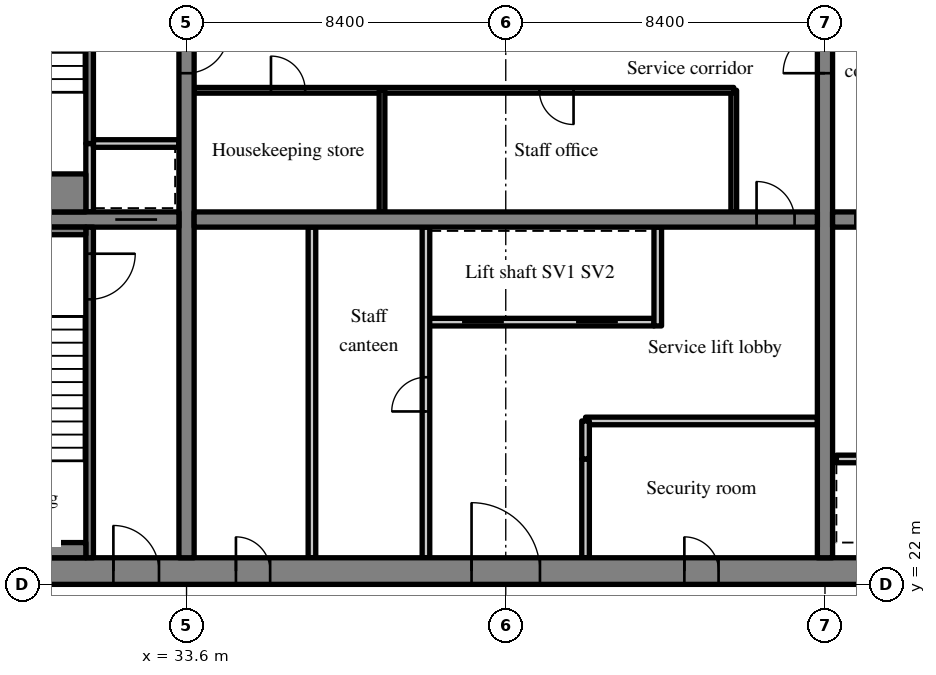
"""IFC4 building model, lengths in metres.
Left out: names, types, materials, properties, quantities, classifications, styles, units other than length and angle.
Written with IfcOpenShell. Run it as: python <this file> out.ifc"""

import sys

from ifc_helpers import new_model, si_unit, direction, frame, frame_2d, origin, place, context, subcontext, project, spatial, rectangle, extrude, source, transform, mapped, element, fill, save


model = new_model("IFC4")
c1 = context("Model", 3, precision=1e-05, world=origin(), true_north=direction((0.0, 1.0)))
c2 = subcontext(c1, "Body", "Model", "MODEL_VIEW")
j1 = project(units=[si_unit("LENGTHUNIT", "METRE"), si_unit("PLANEANGLEUNIT", "RADIAN")], contexts=[c1])
p1 = place(None, origin())
s1 = spatial("IfcSite", under=j1, at=p1, CompositionType="ELEMENT")
p2 = place(p1, origin())
s2 = spatial("IfcBuilding", under=s1, at=p2, CompositionType="ELEMENT")
p3 = place(p2, frame((0.0, 0.0, 166.8)))
s3 = spatial("IfcBuildingStorey", under=s2, at=p3, CompositionType="ELEMENT", Elevation=166.8)
m1 = source(origin(), c2, "Body", "SweptSolid", [
    extrude(rectangle(XDim=50.4, YDim=0.7, at=frame_2d((25.2, 0.0))), origin(), (0.0, 0.0, 1.0), 3.52),
])
p4 = place(p3, frame((25.2, 22.35, 0.0), z_axis=(0.0, 0.0, 1.0), x_axis=(1.0, 0.0, 0.0)))
e1 = element("IfcWall", 1, at=p4, inside=s3, PredefinedType="SHEAR", context=c2, shape_type="MappedRepresentation", body=[
    mapped(m1, transform((0.0, 0.0, 0.0), scale=1.0)),
])
m2 = source(origin(), c2, "Body", "SweptSolid", [
    extrude(rectangle(XDim=1.8, YDim=2.1, at=frame_2d((0.9, 1.05))), frame((0.0, 0.36, 0.0), z_axis=(0.0, -1.0, 0.0), x_axis=(1.0, 0.0, 0.0)), (0.0, 0.0, 1.0), 0.72),
])
p5 = place(p4, frame((15.9, 0.0, 0.0)))
e2 = element("IfcOpeningElement", 2, at=p5, cuts=e1, PredefinedType="OPENING", context=c2, shape_type="MappedRepresentation", body=[
    mapped(m2, transform((0.0, 0.0, 0.0), scale=1.0)),
])
m3 = source(origin(), c2, "Body", "SweptSolid", [
    extrude(rectangle(XDim=0.9, YDim=2.1, at=frame_2d((0.45, 1.05))), frame((0.0, 0.36, 0.0), z_axis=(0.0, -1.0, 0.0), x_axis=(1.0, 0.0, 0.0)), (0.0, 0.0, 1.0), 0.72),
])
p6 = place(p4, frame((9.7, 0.0, 0.0)))
e3 = element("IfcOpeningElement", 3, at=p6, cuts=e1, PredefinedType="OPENING", context=c2, shape_type="MappedRepresentation", body=[
    mapped(m3, transform((0.0, 0.0, 0.0), scale=1.0)),
])
p7 = place(p4, frame((21.5, 0.0, 0.0)))
e4 = element("IfcOpeningElement", 4, at=p7, cuts=e1, PredefinedType="OPENING", context=c2, shape_type="MappedRepresentation", body=[
    mapped(m3, transform((0.0, 0.0, 0.0), scale=1.0)),
])
p8 = place(p4, frame((32.7, 0.0, 0.0)))
e5 = element("IfcOpeningElement", 5, at=p8, cuts=e1, PredefinedType="OPENING", context=c2, shape_type="MappedRepresentation", body=[
    mapped(m2, transform((0.0, 0.0, 0.0), scale=1.0)),
])
m4 = source(origin(), c2, "Body", "SweptSolid", [
    extrude(rectangle(XDim=1.2, YDim=2.1, at=frame_2d((0.6, 1.05))), frame((0.0, 0.36, 0.0), z_axis=(0.0, -1.0, 0.0), x_axis=(1.0, 0.0, 0.0)), (0.0, 0.0, 1.0), 0.72),
])
p9 = place(p4, frame((6.475, 0.0, 0.0)))
e6 = element("IfcOpeningElement", 6, at=p9, cuts=e1, PredefinedType="OPENING", context=c2, shape_type="MappedRepresentation", body=[
    mapped(m4, transform((0.0, 0.0, 0.0), scale=1.0)),
])
p10 = place(p4, frame((47.875, 0.0, 0.0)))
e7 = element("IfcOpeningElement", 7, at=p10, cuts=e1, PredefinedType="OPENING", context=c2, shape_type="MappedRepresentation", body=[
    mapped(m4, transform((0.0, 0.0, 0.0), scale=1.0)),
])
m5 = source(origin(), c2, "Body", "SweptSolid", [
    extrude(rectangle(XDim=18.6, YDim=0.4, at=frame_2d((9.3, 0.0))), origin(), (0.0, 0.0, 1.0), 3.52),
])
p11 = place(p3, frame((33.6, 22.7, 0.0), z_axis=(0.0, 0.0, 1.0), x_axis=(0.0, 1.0, 0.0)))
e8 = element("IfcWall", 8, at=p11, inside=s3, PredefinedType="SHEAR", context=c2, shape_type="MappedRepresentation", body=[
    mapped(m5, transform((0.0, 0.0, 0.0), scale=1.0)),
])
m6 = source(origin(), c2, "Body", "SweptSolid", [
    extrude(rectangle(XDim=1.1, YDim=2.1, at=frame_2d((0.55, 1.05))), frame((0.0, 0.21, 0.0), z_axis=(0.0, -1.0, 0.0), x_axis=(1.0, 0.0, 0.0)), (0.0, 0.0, 1.0), 0.42),
])
p12 = place(p11, frame((12.75, 0.0, 0.0)))
e9 = element("IfcOpeningElement", 9, at=p12, cuts=e8, PredefinedType="OPENING", context=c2, shape_type="MappedRepresentation", body=[
    mapped(m6, transform((0.0, 0.0, 0.0), scale=1.0)),
])
p13 = place(p3, frame((50.4, 22.7, 0.0), z_axis=(0.0, 0.0, 1.0), x_axis=(0.0, 1.0, 0.0)))
e10 = element("IfcWall", 10, at=p13, inside=s3, PredefinedType="SHEAR", context=c2, shape_type="MappedRepresentation", body=[
    mapped(m5, transform((0.0, 0.0, 0.0), scale=1.0)),
])
p14 = place(p13, frame((12.75, 0.0, 0.0)))
e11 = element("IfcOpeningElement", 11, at=p14, cuts=e10, PredefinedType="OPENING", context=c2, shape_type="MappedRepresentation", body=[
    mapped(m6, transform((0.0, 0.0, 0.0), scale=1.0)),
])
m7 = source(origin(), c2, "Body", "SweptSolid", [
    extrude(rectangle(XDim=7.5, YDim=0.4, at=frame_2d((3.75, 0.0))), origin(), (0.0, 0.0, 1.0), 3.52),
])
p15 = place(p3, frame((25.9, 31.6, 0.0), z_axis=(0.0, 0.0, 1.0), x_axis=(1.0, 0.0, 0.0)))
e12 = element("IfcWall", 12, at=p15, inside=s3, PredefinedType="SHEAR", context=c2, shape_type="MappedRepresentation", body=[
    mapped(m7, transform((0.0, 0.0, 0.0), scale=1.0)),
])
p16 = place(p15, frame((5.825, 0.0, 0.0)))
e13 = element("IfcOpeningElement", 13, at=p16, cuts=e12, PredefinedType="OPENING", context=c2, shape_type="MappedRepresentation", body=[
    mapped(m6, transform((0.0, 0.0, 0.0), scale=1.0)),
])
m8 = source(origin(), c2, "Body", "SweptSolid", [
    extrude(rectangle(XDim=16.4, YDim=0.4, at=frame_2d((8.2, 0.0))), origin(), (0.0, 0.0, 1.0), 3.52),
])
p17 = place(p3, frame((33.8, 31.6, 0.0), z_axis=(0.0, 0.0, 1.0), x_axis=(1.0, 0.0, 0.0)))
e14 = element("IfcWall", 14, at=p17, inside=s3, PredefinedType="SHEAR", context=c2, shape_type="MappedRepresentation", body=[
    mapped(m8, transform((0.0, 0.0, 0.0), scale=1.0)),
])
m9 = source(origin(), c2, "Body", "SweptSolid", [
    extrude(rectangle(XDim=1.0, YDim=2.1, at=frame_2d((0.5, 1.05))), frame((0.0, 0.21, 0.0), z_axis=(0.0, -1.0, 0.0), x_axis=(1.0, 0.0, 0.0)), (0.0, 0.0, 1.0), 0.42),
])
p18 = place(p17, frame((14.8, 0.0, 0.0)))
e15 = element("IfcOpeningElement", 15, at=p18, cuts=e14, PredefinedType="OPENING", context=c2, shape_type="MappedRepresentation", body=[
    mapped(m9, transform((0.0, 0.0, 0.0), scale=1.0)),
])
p19 = place(p3, frame((50.6, 31.6, 0.0), z_axis=(0.0, 0.0, 1.0), x_axis=(1.0, 0.0, 0.0)))
e16 = element("IfcWall", 16, at=p19, inside=s3, PredefinedType="SHEAR", context=c2, shape_type="MappedRepresentation", body=[
    mapped(m8, transform((0.0, 0.0, 0.0), scale=1.0)),
])
p20 = place(p19, frame((0.6, 0.0, 0.0)))
e17 = element("IfcOpeningElement", 17, at=p20, cuts=e16, PredefinedType="OPENING", context=c2, shape_type="MappedRepresentation", body=[
    mapped(m9, transform((0.0, 0.0, 0.0), scale=1.0)),
])
m10 = source(origin(), c2, "Body", "SweptSolid", [
    extrude(rectangle(XDim=6.0, YDim=0.2, at=frame_2d((3.0, 0.0))), origin(), (0.0, 0.0, 1.0), 3.52),
])
p21 = place(p3, frame((39.9, 28.9, 0.0), z_axis=(0.0, 0.0, 1.0), x_axis=(1.0, 0.0, 0.0)))
e18 = element("IfcWall", 18, at=p21, inside=s3, PredefinedType="SOLIDWALL", context=c2, shape_type="MappedRepresentation", body=[
    mapped(m10, transform((0.0, 0.0, 0.0), scale=1.0)),
])
m11 = source(origin(), c2, "Body", "SweptSolid", [
    extrude(rectangle(XDim=1.1, YDim=2.1, at=frame_2d((0.55, 1.05))), frame((0.0, 0.11, 0.0), z_axis=(0.0, -1.0, 0.0), x_axis=(1.0, 0.0, 0.0)), (0.0, 0.0, 1.0), 0.22),
])
p22 = place(p21, frame((0.95, 0.0, 0.0)))
e19 = element("IfcOpeningElement", 19, at=p22, cuts=e18, PredefinedType="OPENING", context=c2, shape_type="MappedRepresentation", body=[
    mapped(m11, transform((0.0, 0.0, 0.0), scale=1.0)),
])
p23 = place(p21, frame((3.95, 0.0, 0.0)))
e20 = element("IfcOpeningElement", 20, at=p23, cuts=e18, PredefinedType="OPENING", context=c2, shape_type="MappedRepresentation", body=[
    mapped(m11, transform((0.0, 0.0, 0.0), scale=1.0)),
])
m12 = source(origin(), c2, "Body", "SweptSolid", [
    extrude(rectangle(XDim=8.7, YDim=0.2, at=frame_2d((4.35, 0.0))), origin(), (0.0, 0.0, 1.0), 3.52),
])
p24 = place(p3, frame((39.9, 22.7, 0.0), z_axis=(0.0, 0.0, 1.0), x_axis=(0.0, 1.0, 0.0)))
e21 = element("IfcWall", 21, at=p24, inside=s3, PredefinedType="PARTITIONING", context=c2, shape_type="MappedRepresentation", body=[
    mapped(m12, transform((0.0, 0.0, 0.0), scale=1.0)),
])
m13 = source(origin(), c2, "Body", "SweptSolid", [
    extrude(rectangle(XDim=0.9, YDim=2.1, at=frame_2d((0.45, 1.05))), frame((0.0, 0.11, 0.0), z_axis=(0.0, -1.0, 0.0), x_axis=(1.0, 0.0, 0.0)), (0.0, 0.0, 1.0), 0.22),
])
p25 = place(p24, frame((3.85, 0.0, 0.0)))
e22 = element("IfcOpeningElement", 22, at=p25, cuts=e21, PredefinedType="OPENING", context=c2, shape_type="MappedRepresentation", body=[
    mapped(m13, transform((0.0, 0.0, 0.0), scale=1.0)),
])
m14 = source(origin(), c2, "Body", "SweptSolid", [
    extrude(rectangle(XDim=2.6, YDim=0.2, at=frame_2d((1.3, 0.0))), origin(), (0.0, 0.0, 1.0), 3.52),
])
p26 = place(p3, frame((44.1, 22.7, 0.0), z_axis=(0.0, 0.0, 1.0), x_axis=(0.0, 1.0, 0.0)))
e23 = element("IfcWall", 23, at=p26, inside=s3, PredefinedType="PARTITIONING", context=c2, shape_type="MappedRepresentation", body=[
    mapped(m14, transform((0.0, 0.0, 0.0), scale=1.0)),
])
m15 = source(origin(), c2, "Body", "SweptSolid", [
    extrude(rectangle(XDim=2.6, YDim=0.2, at=frame_2d((1.3, 0.0))), origin(), (0.0, 0.0, 1.0), 3.52),
])
p27 = place(p3, frame((46.0, 28.8, 0.0), z_axis=(0.0, 0.0, 1.0), x_axis=(0.0, 1.0, 0.0)))
e24 = element("IfcWall", 24, at=p27, inside=s3, PredefinedType="SOLIDWALL", context=c2, shape_type="MappedRepresentation", body=[
    mapped(m15, transform((0.0, 0.0, 0.0), scale=1.0)),
])
p28 = place(p3, frame((36.9, 22.7, 0.0), z_axis=(0.0, 0.0, 1.0), x_axis=(0.0, 1.0, 0.0)))
e25 = element("IfcWall", 25, at=p28, inside=s3, PredefinedType="PARTITIONING", context=c2, shape_type="MappedRepresentation", body=[
    mapped(m12, transform((0.0, 0.0, 0.0), scale=1.0)),
])
m16 = source(origin(), c2, "Body", "SweptSolid", [
    extrude(rectangle(XDim=6.1, YDim=0.2, at=frame_2d((3.05, 0.0))), origin(), (0.0, 0.0, 1.0), 3.52),
])
p29 = place(p3, frame((44.1, 26.3, 0.0), z_axis=(0.0, 0.0, 1.0), x_axis=(1.0, 0.0, 0.0)))
e26 = element("IfcWall", 26, at=p29, inside=s3, PredefinedType="PARTITIONING", context=c2, shape_type="MappedRepresentation", body=[
    mapped(m16, transform((0.0, 0.0, 0.0), scale=1.0)),
])
m17 = source(origin(), c2, "Body", "SweptSolid", [
    extrude(rectangle(XDim=1.0, YDim=0.2, at=frame_2d((0.5, 0.0))), origin(), (0.0, 0.0, 1.0), 3.52),
])
p30 = place(p3, frame((44.1, 25.3, 0.0), z_axis=(0.0, 0.0, 1.0), x_axis=(0.0, 1.0, 0.0)))
e27 = element("IfcWall", 27, at=p30, inside=s3, PredefinedType="PARTITIONING", context=c2, shape_type="MappedRepresentation", body=[
    mapped(m17, transform((0.0, 0.0, 0.0), scale=1.0)),
])
m18 = source(origin(), c2, "Body", "SweptSolid", [
    extrude(rectangle(XDim=3.2, YDim=0.15, at=frame_2d((1.6, 0.0))), origin(), (0.0, 0.0, 1.0), 3.52),
])
p31 = place(p3, frame((48.0, 31.8, 0.0), z_axis=(0.0, 0.0, 1.0), x_axis=(0.0, 1.0, 0.0)))
e28 = element("IfcWall", 28, at=p31, inside=s3, PredefinedType="PARTITIONING", context=c2, shape_type="MappedRepresentation", body=[
    mapped(m18, transform((0.0, 0.0, 0.0), scale=1.0)),
])
m19 = source(origin(), c2, "Body", "SweptSolid", [
    extrude(rectangle(XDim=14.2, YDim=0.15, at=frame_2d((7.1, 0.0))), origin(), (0.0, 0.0, 1.0), 3.52),
])
p32 = place(p3, frame((33.8, 35.0, 0.0), z_axis=(0.0, 0.0, 1.0), x_axis=(1.0, 0.0, 0.0)))
e29 = element("IfcWall", 29, at=p32, inside=s3, PredefinedType="PARTITIONING", context=c2, shape_type="MappedRepresentation", body=[
    mapped(m19, transform((0.0, 0.0, 0.0), scale=1.0)),
])
m20 = source(origin(), c2, "Body", "SweptSolid", [
    extrude(rectangle(XDim=0.9, YDim=2.1, at=frame_2d((0.45, 1.05))), frame((0.0, 0.085, 0.0), z_axis=(0.0, -1.0, 0.0), x_axis=(1.0, 0.0, 0.0)), (0.0, 0.0, 1.0), 0.17),
])
p33 = place(p32, frame((2.022, 0.0, 0.0)))
e30 = element("IfcOpeningElement", 30, at=p33, cuts=e29, PredefinedType="OPENING", context=c2, shape_type="MappedRepresentation", body=[
    mapped(m20, transform((0.0, 0.0, 0.0), scale=1.0)),
])
p34 = place(p32, frame((9.084, 0.0, 0.0)))
e31 = element("IfcOpeningElement", 31, at=p34, cuts=e29, PredefinedType="OPENING", context=c2, shape_type="MappedRepresentation", body=[
    mapped(m20, transform((0.0, 0.0, 0.0), scale=1.0)),
])
p35 = place(p3, frame((38.744, 31.8, 0.0), z_axis=(0.0, 0.0, 1.0), x_axis=(0.0, 1.0, 0.0)))
e32 = element("IfcWall", 32, at=p35, inside=s3, PredefinedType="PARTITIONING", context=c2, shape_type="MappedRepresentation", body=[
    mapped(m18, transform((0.0, 0.0, 0.0), scale=1.0)),
])
p36 = place(p3, frame((56.7, 25.3, 0.0), z_axis=(0.0, 0.0, 1.0), x_axis=(-1.0, 0.0, 0.0)))
e33 = element("IfcWall", 33, at=p36, inside=s3, PredefinedType="SOLIDWALL", context=c2, shape_type="MappedRepresentation", body=[
    mapped(m10, transform((0.0, 0.0, 0.0), scale=1.0)),
])
p37 = place(p36, frame((0.95, 0.0, 0.0)))
e34 = element("IfcOpeningElement", 34, at=p37, cuts=e33, PredefinedType="OPENING", context=c2, shape_type="MappedRepresentation", body=[
    mapped(m11, transform((0.0, 0.0, 0.0), scale=1.0)),
])
p38 = place(p36, frame((3.95, 0.0, 0.0)))
e35 = element("IfcOpeningElement", 35, at=p38, cuts=e33, PredefinedType="OPENING", context=c2, shape_type="MappedRepresentation", body=[
    mapped(m11, transform((0.0, 0.0, 0.0), scale=1.0)),
])
m21 = source(origin(), c2, "Body", "SweptSolid", [
    extrude(rectangle(XDim=8.7, YDim=0.2, at=frame_2d((4.35, 0.0))), origin(), (0.0, 0.0, 1.0), 3.52),
])
p39 = place(p3, frame((31.05, 22.7, 0.0), z_axis=(0.0, 0.0, 1.0), x_axis=(0.0, 1.0, 0.0)))
e36 = element("IfcWall", 36, at=p39, inside=s3, PredefinedType="SOLIDWALL", context=c2, shape_type="MappedRepresentation", body=[
    mapped(m21, transform((0.0, 0.0, 0.0), scale=1.0)),
])
m22 = source(origin(), c2, "Body", "SweptSolid", [
    extrude(rectangle(XDim=1.2, YDim=2.1, at=frame_2d((0.6, 1.05))), frame((0.0, 0.11, 0.0), z_axis=(0.0, -1.0, 0.0), x_axis=(1.0, 0.0, 0.0)), (0.0, 0.0, 1.0), 0.22),
])
p40 = place(p39, frame((6.8, 0.0, 0.0)))
e37 = element("IfcOpeningElement", 37, at=p40, cuts=e36, PredefinedType="OPENING", context=c2, shape_type="MappedRepresentation", body=[
    mapped(m22, transform((0.0, 0.0, 0.0), scale=1.0)),
])
m23 = source(origin(), c2, "Body", "SweptSolid", [
    extrude(rectangle(XDim=1.8, YDim=0.2, at=frame_2d((0.9, 0.0))), origin(), (0.0, 0.0, 1.0), 3.52),
])
p41 = place(p3, frame((31.05, 31.8, 0.0), z_axis=(0.0, 0.0, 1.0), x_axis=(0.0, 1.0, 0.0)))
e38 = element("IfcWall", 38, at=p41, inside=s3, PredefinedType="SOLIDWALL", context=c2, shape_type="MappedRepresentation", body=[
    mapped(m23, transform((0.0, 0.0, 0.0), scale=1.0)),
])
m24 = source(origin(), c2, "Body", "SweptSolid", [
    extrude(rectangle(XDim=2.25, YDim=0.2, at=frame_2d((1.125, 0.0))), origin(), (0.0, 0.0, 1.0), 3.52),
])
p42 = place(p3, frame((31.15, 33.6, 0.0), z_axis=(0.0, 0.0, 1.0), x_axis=(1.0, 0.0, 0.0)))
e39 = element("IfcWall", 39, at=p42, inside=s3, PredefinedType="SOLIDWALL", context=c2, shape_type="MappedRepresentation", body=[
    mapped(m24, transform((0.0, 0.0, 0.0), scale=1.0)),
])
m25 = source(origin(), c2, "Body", "SweptSolid", [
    extrude(rectangle(XDim=7.7, YDim=0.2, at=frame_2d((3.85, 0.0))), origin(), (0.0, 0.0, 1.0), 3.52),
])
p43 = place(p3, frame((31.05, 33.6, 0.0), z_axis=(0.0, 0.0, 1.0), x_axis=(0.0, 1.0, 0.0)))
e40 = element("IfcWall", 40, at=p43, inside=s3, PredefinedType="SOLIDWALL", context=c2, shape_type="MappedRepresentation", body=[
    mapped(m25, transform((0.0, 0.0, 0.0), scale=1.0)),
])
m26 = source(origin(), c2, "Body", "SweptSolid", [
    extrude(rectangle(XDim=1.8, YDim=2.1, at=frame_2d((0.9, 1.05))), frame((0.0, 0.11, 0.0), z_axis=(0.0, -1.0, 0.0), x_axis=(1.0, 0.0, 0.0)), (0.0, 0.0, 1.0), 0.22),
])
p44 = place(p43, frame((5.3, 0.0, 0.0)))
e41 = element("IfcOpeningElement", 41, at=p44, cuts=e40, PredefinedType="OPENING", context=c2, shape_type="MappedRepresentation", body=[
    mapped(m26, transform((0.0, 0.0, 0.0), scale=1.0)),
])
m27 = source(origin(), c2, "Body", "SweptSolid", [
    extrude(rectangle(XDim=5.05, YDim=0.4, at=frame_2d((2.525, 0.0))), origin(), (0.0, 0.0, 1.0), 3.52),
])
p45 = place(p3, frame((25.9, 22.9, 0.0), z_axis=(0.0, 0.0, 1.0), x_axis=(1.0, 0.0, 0.0)))
e42 = element("IfcWall", 42, at=p45, inside=s3, PredefinedType="SOLIDWALL", context=c2, shape_type="MappedRepresentation", body=[
    mapped(m27, transform((0.0, 0.0, 0.0), scale=1.0)),
])
m28 = source(origin(), c2, "Body", "SweptSolid", [
    extrude(rectangle(XDim=5.05, YDim=0.2, at=frame_2d((2.525, 0.0))), origin(), (0.0, 0.0, 1.0), 3.52),
])
p46 = place(p3, frame((25.9, 31.3, 0.0), z_axis=(0.0, 0.0, 1.0), x_axis=(1.0, 0.0, 0.0)))
e43 = element("IfcWall", 43, at=p46, inside=s3, PredefinedType="SOLIDWALL", context=c2, shape_type="MappedRepresentation", body=[
    mapped(m28, transform((0.0, 0.0, 0.0), scale=1.0)),
])
m29 = source(origin(), c2, "Body", "SweptSolid", [
    extrude(rectangle(XDim=5.05, YDim=1.0, at=frame_2d((2.525, 0.0))), origin(), (0.0, 0.0, 1.0), 3.52),
])
p47 = place(p3, frame((25.9, 32.3, 0.0), z_axis=(0.0, 0.0, 1.0), x_axis=(1.0, 0.0, 0.0)))
e44 = element("IfcWall", 44, at=p47, inside=s3, PredefinedType="SOLIDWALL", context=c2, shape_type="MappedRepresentation", body=[
    mapped(m29, transform((0.0, 0.0, 0.0), scale=1.0)),
])
m30 = source(origin(), c2, "Body", "SweptSolid", [
    extrude(rectangle(XDim=1.8, YDim=2.1, at=frame_2d((0.9, 1.05))), frame((0.0, 0.275, 0.0), z_axis=(0.0, -1.0, 0.0), x_axis=(1.0, 0.0, 0.0)), (0.0, 0.0, 1.0), 0.05),
])
p48 = place(p5, origin())
e45 = element("IfcDoor", 45, at=p48, inside=s3, OperationType="DOUBLE_DOOR_SINGLE_SWING", PredefinedType="DOOR", context=c2, shape_type="MappedRepresentation", body=[
    mapped(m30, transform((0.0, 0.0, 0.0), scale=1.0)),
])
fill(e2, e45)
m31 = source(origin(), c2, "Body", "SweptSolid", [
    extrude(rectangle(XDim=1.0, YDim=2.1, at=frame_2d((0.5, 1.05))), frame((0.0, 0.025, 0.0), z_axis=(0.0, -1.0, 0.0), x_axis=(1.0, 0.0, 0.0)), (0.0, 0.0, 1.0), 0.05),
])
p49 = place(p18, origin())
e46 = element("IfcDoor", 46, at=p49, inside=s3, OperationType="SINGLE_SWING_LEFT", PredefinedType="DOOR", context=c2, shape_type="MappedRepresentation", body=[
    mapped(m31, transform((0.0, 0.0, 0.0), scale=1.0)),
])
fill(e15, e46)
m32 = source(origin(), c2, "Body", "SweptSolid", [
    extrude(rectangle(XDim=1.1, YDim=2.1, at=frame_2d((0.55, 1.05))), frame((0.0, 0.025, 0.0), z_axis=(0.0, -1.0, 0.0), x_axis=(1.0, 0.0, 0.0)), (0.0, 0.0, 1.0), 0.05),
])
p50 = place(p22, origin())
e47 = element("IfcDoor", 47, at=p50, inside=s3, OperationType="SLIDING_TO_LEFT", PredefinedType="DOOR", context=c2, shape_type="MappedRepresentation", body=[
    mapped(m32, transform((0.0, 0.0, 0.0), scale=1.0)),
])
fill(e19, e47)
p51 = place(p23, origin())
e48 = element("IfcDoor", 48, at=p51, inside=s3, OperationType="SLIDING_TO_RIGHT", PredefinedType="DOOR", context=c2, shape_type="MappedRepresentation", body=[
    mapped(m32, transform((0.0, 0.0, 0.0), scale=1.0)),
])
fill(e20, e48)
m33 = source(origin(), c2, "Body", "SweptSolid", [
    extrude(rectangle(XDim=0.9, YDim=2.1, at=frame_2d((0.45, 1.05))), frame((0.0, 0.275, 0.0), z_axis=(0.0, -1.0, 0.0), x_axis=(1.0, 0.0, 0.0)), (0.0, 0.0, 1.0), 0.05),
])
p52 = place(p6, origin())
e49 = element("IfcDoor", 49, at=p52, inside=s3, OperationType="SINGLE_SWING_LEFT", PredefinedType="DOOR", context=c2, shape_type="MappedRepresentation", body=[
    mapped(m33, transform((0.0, 0.0, 0.0), scale=1.0)),
])
fill(e3, e49)
m34 = source(origin(), c2, "Body", "SweptSolid", [
    extrude(rectangle(XDim=0.9, YDim=2.1, at=frame_2d((0.45, 1.05))), frame((0.0, 0.025, 0.0), z_axis=(0.0, -1.0, 0.0), x_axis=(1.0, 0.0, 0.0)), (0.0, 0.0, 1.0), 0.05),
])
p53 = place(p25, origin())
e50 = element("IfcDoor", 50, at=p53, inside=s3, OperationType="SINGLE_SWING_LEFT", PredefinedType="DOOR", context=c2, shape_type="MappedRepresentation", body=[
    mapped(m34, transform((0.0, 0.0, 0.0), scale=1.0)),
])
fill(e22, e50)
p54 = place(p7, origin())
e51 = element("IfcDoor", 51, at=p54, inside=s3, OperationType="SINGLE_SWING_LEFT", PredefinedType="DOOR", context=c2, shape_type="MappedRepresentation", body=[
    mapped(m33, transform((0.0, 0.0, 0.0), scale=1.0)),
])
fill(e4, e51)
p55 = place(p33, origin())
e52 = element("IfcDoor", 52, at=p55, inside=s3, OperationType="SINGLE_SWING_LEFT", PredefinedType="DOOR", context=c2, shape_type="MappedRepresentation", body=[
    mapped(m34, transform((0.0, 0.0, 0.0), scale=1.0)),
])
fill(e30, e52)
p56 = place(p34, origin())
e53 = element("IfcDoor", 53, at=p56, inside=s3, OperationType="SINGLE_SWING_RIGHT", PredefinedType="DOOR", context=c2, shape_type="MappedRepresentation", body=[
    mapped(m34, transform((0.0, 0.0, 0.0), scale=1.0)),
])
fill(e31, e53)
m35 = source(origin(), c2, "Body", "SweptSolid", [
    extrude(rectangle(XDim=1.2, YDim=2.1, at=frame_2d((0.6, 1.05))), frame((0.0, 0.025, 0.0), z_axis=(0.0, -1.0, 0.0), x_axis=(1.0, 0.0, 0.0)), (0.0, 0.0, 1.0), 0.05),
])
p57 = place(p40, origin())
e54 = element("IfcDoor", 54, at=p57, inside=s3, OperationType="SINGLE_SWING_RIGHT", PredefinedType="DOOR", context=c2, shape_type="MappedRepresentation", body=[
    mapped(m35, transform((0.0, 0.0, 0.0), scale=1.0)),
])
fill(e37, e54)
m36 = source(origin(), c2, "Body", "SweptSolid", [
    extrude(rectangle(XDim=1.2, YDim=2.1, at=frame_2d((0.6, 1.05))), frame((0.0, 0.275, 0.0), z_axis=(0.0, -1.0, 0.0), x_axis=(1.0, 0.0, 0.0)), (0.0, 0.0, 1.0), 0.05),
])
p58 = place(p9, origin())
e55 = element("IfcDoor", 55, at=p58, inside=s3, OperationType="SINGLE_SWING_LEFT", PredefinedType="DOOR", context=c2, shape_type="MappedRepresentation", body=[
    mapped(m36, transform((0.0, 0.0, 0.0), scale=1.0)),
])
fill(e6, e55)
p59 = place(p16, origin())
e56 = element("IfcDoor", 56, at=p59, inside=s3, OperationType="SLIDING_TO_LEFT", PredefinedType="DOOR", context=c2, shape_type="MappedRepresentation", body=[
    mapped(m32, transform((0.0, 0.0, 0.0), scale=1.0)),
])
fill(e13, e56)
p60 = place(p12, origin())
e57 = element("IfcDoor", 57, at=p60, inside=s3, OperationType="SINGLE_SWING_RIGHT", PredefinedType="DOOR", context=c2, shape_type="MappedRepresentation", body=[
    mapped(m32, transform((0.0, 0.0, 0.0), scale=1.0)),
])
fill(e9, e57)
p61 = place(p14, origin())
e58 = element("IfcDoor", 58, at=p61, inside=s3, OperationType="SINGLE_SWING_LEFT", PredefinedType="DOOR", context=c2, shape_type="MappedRepresentation", body=[
    mapped(m32, transform((0.0, 0.0, 0.0), scale=1.0)),
])
fill(e11, e58)
save(model, sys.argv[1])
